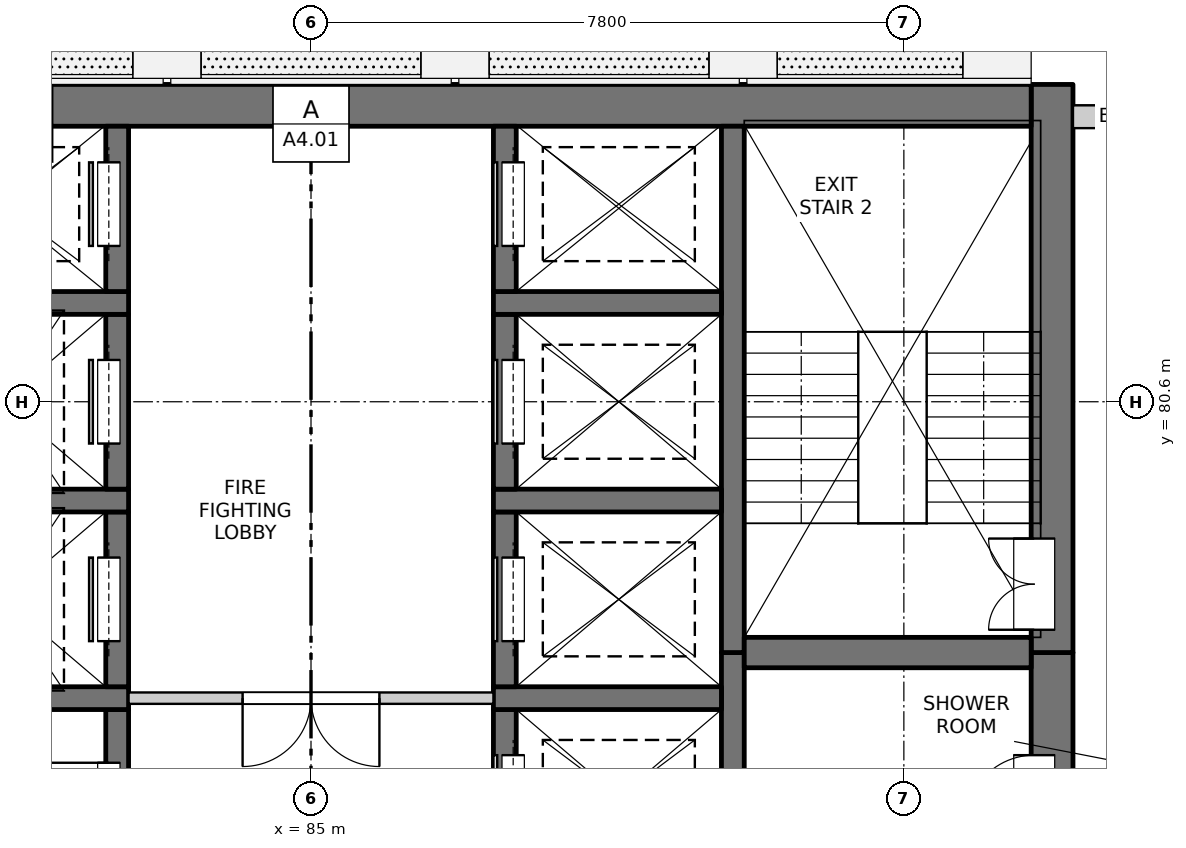
"""IFC4 building model, lengths in metres.
Left out: names, types, materials, properties, quantities, classifications, styles, units other than length and angle.
Written with IfcOpenShell. Run it as: python <this file> out.ifc"""

import sys

from ifc_helpers import new_model, si_unit, direction, frame, frame_2d, origin, place, context, subcontext, project, spatial, rectangle, extrude, element, fill, save


model = new_model("IFC4")
c1 = context("Model", 3, precision=1e-05, world=origin(), true_north=direction((0.0, 1.0)))
c2 = subcontext(c1, "Body", "Model", "MODEL_VIEW")
j1 = project(units=[si_unit("LENGTHUNIT", "METRE"), si_unit("PLANEANGLEUNIT", "RADIAN")], contexts=[c1])
p1 = place(None, origin())
s1 = spatial("IfcSite", under=j1, at=p1, CompositionType="ELEMENT")
p2 = place(p1, origin())
s2 = spatial("IfcBuilding", under=s1, at=p2, CompositionType="ELEMENT")
p3 = place(p2, frame((0.0, 0.0, 140.7)))
s3 = spatial("IfcBuildingStorey", under=s2, at=p3, CompositionType="ELEMENT", Elevation=140.7)
p4 = place(p3, frame((94.75, 61.95, -0.25), z_axis=(0.0, 0.0, 1.0), x_axis=(0.0, 1.0, 0.0)))
e1 = element("IfcWall", 1, at=p4, inside=s3, PredefinedType="SOLIDWALL", context=c2, shape_type="SweptSolid", body=[
    extrude(rectangle(XDim=15.35, YDim=0.55, at=frame_2d((7.675, 0.0))), origin(), (0.0, 0.0, 1.0), 3.35),
])
p5 = place(p4, frame((0.925, 0.0, 0.25)))
e2 = element("IfcOpeningElement", 2, at=p5, cuts=e1, PredefinedType="OPENING", context=c2, shape_type="SweptSolid", body=[
    extrude(rectangle(XDim=0.9, YDim=2.1, at=frame_2d((0.45, 1.05))), frame((0.0, 0.285, 0.0), z_axis=(0.0, -1.0, 0.0), x_axis=(1.0, 0.0, 0.0)), (0.0, 0.0, 1.0), 0.57),
])
p6 = place(p4, frame((3.8, 0.0, 0.25)))
e3 = element("IfcOpeningElement", 3, at=p6, cuts=e1, PredefinedType="OPENING", context=c2, shape_type="SweptSolid", body=[
    extrude(rectangle(XDim=0.9, YDim=2.1, at=frame_2d((0.45, 1.05))), frame((0.0, 0.285, 0.0), z_axis=(0.0, -1.0, 0.0), x_axis=(1.0, 0.0, 0.0)), (0.0, 0.0, 1.0), 0.57),
])
p7 = place(p4, frame((6.8, 0.0, 0.25)))
e4 = element("IfcOpeningElement", 4, at=p7, cuts=e1, PredefinedType="OPENING", context=c2, shape_type="SweptSolid", body=[
    extrude(rectangle(XDim=0.9, YDim=2.1, at=frame_2d((0.45, 1.05))), frame((0.0, 0.285, 0.0), z_axis=(0.0, -1.0, 0.0), x_axis=(1.0, 0.0, 0.0)), (0.0, 0.0, 1.0), 0.57),
])
p8 = place(p4, frame((9.8, 0.0, 0.25)))
e5 = element("IfcOpeningElement", 5, at=p8, cuts=e1, PredefinedType="OPENING", context=c2, shape_type="SweptSolid", body=[
    extrude(rectangle(XDim=0.9, YDim=2.1, at=frame_2d((0.45, 1.05))), frame((0.0, 0.285, 0.0), z_axis=(0.0, -1.0, 0.0), x_axis=(1.0, 0.0, 0.0)), (0.0, 0.0, 1.0), 0.57),
])
p9 = place(p4, frame((13.1, 0.0, 0.25)))
e6 = element("IfcOpeningElement", 6, at=p9, cuts=e1, PredefinedType="OPENING", context=c2, shape_type="SweptSolid", body=[
    extrude(rectangle(XDim=0.9, YDim=2.1, at=frame_2d((0.45, 1.05))), frame((0.0, 0.285, 0.0), z_axis=(0.0, -1.0, 0.0), x_axis=(1.0, 0.0, 0.0)), (0.0, 0.0, 1.0), 0.57),
])
p10 = place(p3, frame((94.75, 77.3, -0.25), z_axis=(0.0, 0.0, 1.0), x_axis=(0.0, 1.0, 0.0)))
e7 = element("IfcWall", 7, at=p10, inside=s3, PredefinedType="SOLIDWALL", context=c2, shape_type="SweptSolid", body=[
    extrude(rectangle(XDim=7.475, YDim=0.55, at=frame_2d((3.737, 0.0))), origin(), (0.0, 0.0, 1.0), 3.35),
])
p11 = place(p10, frame((0.3, 0.0, 0.25)))
e8 = element("IfcOpeningElement", 8, at=p11, cuts=e7, PredefinedType="OPENING", context=c2, shape_type="SweptSolid", body=[
    extrude(rectangle(XDim=1.2, YDim=2.1, at=frame_2d((0.6, 1.05))), frame((0.0, 0.285, 0.0), z_axis=(0.0, -1.0, 0.0), x_axis=(1.0, 0.0, 0.0)), (0.0, 0.0, 1.0), 0.57),
])
p12 = place(p3, frame((75.525, 84.5, -0.25), z_axis=(0.0, 0.0, 1.0), x_axis=(1.0, 0.0, 0.0)))
e9 = element("IfcWall", 9, at=p12, inside=s3, PredefinedType="SOLIDWALL", context=c2, shape_type="SweptSolid", body=[
    extrude(rectangle(XDim=18.95, YDim=0.55, at=frame_2d((9.475, 0.0))), origin(), (0.0, 0.0, 1.0), 3.35),
])
p13 = place(p3, frame((90.55, 61.95, -0.25), z_axis=(0.0, 0.0, 1.0), x_axis=(0.0, 1.0, 0.0)))
e10 = element("IfcWall", 10, at=p13, inside=s3, PredefinedType="SOLIDWALL", context=c2, shape_type="SweptSolid", body=[
    extrude(rectangle(XDim=15.35, YDim=0.3, at=frame_2d((7.675, 0.0))), origin(), (0.0, 0.0, 1.0), 3.35),
])
p14 = place(p3, frame((90.55, 77.3, -0.25), z_axis=(0.0, 0.0, 1.0), x_axis=(0.0, 1.0, 0.0)))
e11 = element("IfcWall", 11, at=p14, inside=s3, PredefinedType="SOLIDWALL", context=c2, shape_type="SweptSolid", body=[
    extrude(rectangle(XDim=6.925, YDim=0.3, at=frame_2d((3.462, 0.0))), origin(), (0.0, 0.0, 1.0), 3.35),
])
p15 = place(p3, frame((82.45, 74.25, -0.25), z_axis=(0.0, 0.0, 1.0), x_axis=(0.0, 1.0, 0.0)))
e12 = element("IfcWall", 12, at=p15, inside=s3, PredefinedType="SOLIDWALL", context=c2, shape_type="SweptSolid", body=[
    extrude(rectangle(XDim=2.3, YDim=0.3, at=frame_2d((1.15, 0.0))), origin(), (0.0, 0.0, 1.0), 3.35),
])
p16 = place(p15, frame((0.7, 0.0, 0.25)))
e13 = element("IfcOpeningElement", 13, at=p16, cuts=e12, PredefinedType="OPENING", context=c2, shape_type="SweptSolid", body=[
    extrude(rectangle(XDim=0.9, YDim=2.1, at=frame_2d((0.45, 1.05))), frame((0.0, 0.16, 0.0), z_axis=(0.0, -1.0, 0.0), x_axis=(1.0, 0.0, 0.0)), (0.0, 0.0, 1.0), 0.32),
])
p17 = place(p3, frame((79.6, 76.7, -0.25), z_axis=(0.0, 0.0, 1.0), x_axis=(1.0, 0.0, 0.0)))
e14 = element("IfcWall", 14, at=p17, inside=s3, PredefinedType="SOLIDWALL", context=c2, shape_type="SweptSolid", body=[
    extrude(rectangle(XDim=3.0, YDim=0.3, at=frame_2d((1.5, 0.0))), origin(), (0.0, 0.0, 1.0), 3.35),
])
p18 = place(p3, frame((82.45, 76.85, -0.25), z_axis=(0.0, 0.0, 1.0), x_axis=(0.0, 1.0, 0.0)))
e15 = element("IfcWall", 15, at=p18, inside=s3, PredefinedType="SOLIDWALL", context=c2, shape_type="SweptSolid", body=[
    extrude(rectangle(XDim=2.3, YDim=0.3, at=frame_2d((1.15, 0.0))), origin(), (0.0, 0.0, 1.0), 3.35),
])
p19 = place(p18, frame((0.6, 0.0, 0.25)))
e16 = element("IfcOpeningElement", 16, at=p19, cuts=e15, PredefinedType="OPENING", context=c2, shape_type="SweptSolid", body=[
    extrude(rectangle(XDim=1.1, YDim=2.1, at=frame_2d((0.55, 1.05))), frame((0.0, 0.16, 0.0), z_axis=(0.0, -1.0, 0.0), x_axis=(1.0, 0.0, 0.0)), (0.0, 0.0, 1.0), 0.32),
])
p20 = place(p3, frame((79.6, 79.3, -0.25), z_axis=(0.0, 0.0, 1.0), x_axis=(1.0, 0.0, 0.0)))
e17 = element("IfcWall", 17, at=p20, inside=s3, PredefinedType="SOLIDWALL", context=c2, shape_type="SweptSolid", body=[
    extrude(rectangle(XDim=3.0, YDim=0.3, at=frame_2d((1.5, 0.0))), origin(), (0.0, 0.0, 1.0), 3.35),
])
p21 = place(p3, frame((82.45, 79.45, -0.25), z_axis=(0.0, 0.0, 1.0), x_axis=(0.0, 1.0, 0.0)))
e18 = element("IfcWall", 18, at=p21, inside=s3, PredefinedType="SOLIDWALL", context=c2, shape_type="SweptSolid", body=[
    extrude(rectangle(XDim=2.3, YDim=0.3, at=frame_2d((1.15, 0.0))), origin(), (0.0, 0.0, 1.0), 3.35),
])
p22 = place(p21, frame((0.6, 0.0, 0.25)))
e19 = element("IfcOpeningElement", 19, at=p22, cuts=e18, PredefinedType="OPENING", context=c2, shape_type="SweptSolid", body=[
    extrude(rectangle(XDim=1.1, YDim=2.1, at=frame_2d((0.55, 1.05))), frame((0.0, 0.16, 0.0), z_axis=(0.0, -1.0, 0.0), x_axis=(1.0, 0.0, 0.0)), (0.0, 0.0, 1.0), 0.32),
])
p23 = place(p3, frame((79.6, 81.9, -0.25), z_axis=(0.0, 0.0, 1.0), x_axis=(1.0, 0.0, 0.0)))
e20 = element("IfcWall", 20, at=p23, inside=s3, PredefinedType="SOLIDWALL", context=c2, shape_type="SweptSolid", body=[
    extrude(rectangle(XDim=3.0, YDim=0.3, at=frame_2d((1.5, 0.0))), origin(), (0.0, 0.0, 1.0), 3.35),
])
p24 = place(p3, frame((82.45, 82.05, -0.25), z_axis=(0.0, 0.0, 1.0), x_axis=(0.0, 1.0, 0.0)))
e21 = element("IfcWall", 21, at=p24, inside=s3, PredefinedType="SOLIDWALL", context=c2, shape_type="SweptSolid", body=[
    extrude(rectangle(XDim=2.175, YDim=0.3, at=frame_2d((1.087, 0.0))), origin(), (0.0, 0.0, 1.0), 3.35),
])
p25 = place(p24, frame((0.6, 0.0, 0.25)))
e22 = element("IfcOpeningElement", 22, at=p25, cuts=e21, PredefinedType="OPENING", context=c2, shape_type="SweptSolid", body=[
    extrude(rectangle(XDim=1.1, YDim=2.1, at=frame_2d((0.55, 1.05))), frame((0.0, 0.16, 0.0), z_axis=(0.0, -1.0, 0.0), x_axis=(1.0, 0.0, 0.0)), (0.0, 0.0, 1.0), 0.32),
])
p26 = place(p3, frame((87.55, 74.25, -0.25), z_axis=(0.0, 0.0, 1.0), x_axis=(0.0, 1.0, 0.0)))
e23 = element("IfcWall", 23, at=p26, inside=s3, PredefinedType="SOLIDWALL", context=c2, shape_type="SweptSolid", body=[
    extrude(rectangle(XDim=2.3, YDim=0.3, at=frame_2d((1.15, 0.0))), origin(), (0.0, 0.0, 1.0), 3.35),
])
p27 = place(p26, frame((0.6, 0.0, 0.25)))
e24 = element("IfcOpeningElement", 24, at=p27, cuts=e23, PredefinedType="OPENING", context=c2, shape_type="SweptSolid", body=[
    extrude(rectangle(XDim=1.1, YDim=2.1, at=frame_2d((0.55, 1.05))), frame((0.0, 0.16, 0.0), z_axis=(0.0, -1.0, 0.0), x_axis=(1.0, 0.0, 0.0)), (0.0, 0.0, 1.0), 0.32),
])
p28 = place(p3, frame((87.4, 76.7, -0.25), z_axis=(0.0, 0.0, 1.0), x_axis=(1.0, 0.0, 0.0)))
e25 = element("IfcWall", 25, at=p28, inside=s3, PredefinedType="SOLIDWALL", context=c2, shape_type="SweptSolid", body=[
    extrude(rectangle(XDim=3.0, YDim=0.3, at=frame_2d((1.5, 0.0))), origin(), (0.0, 0.0, 1.0), 3.35),
])
p29 = place(p3, frame((87.55, 76.85, -0.25), z_axis=(0.0, 0.0, 1.0), x_axis=(0.0, 1.0, 0.0)))
e26 = element("IfcWall", 26, at=p29, inside=s3, PredefinedType="SOLIDWALL", context=c2, shape_type="SweptSolid", body=[
    extrude(rectangle(XDim=2.3, YDim=0.3, at=frame_2d((1.15, 0.0))), origin(), (0.0, 0.0, 1.0), 3.35),
])
p30 = place(p29, frame((0.6, 0.0, 0.25)))
e27 = element("IfcOpeningElement", 27, at=p30, cuts=e26, PredefinedType="OPENING", context=c2, shape_type="SweptSolid", body=[
    extrude(rectangle(XDim=1.1, YDim=2.1, at=frame_2d((0.55, 1.05))), frame((0.0, 0.16, 0.0), z_axis=(0.0, -1.0, 0.0), x_axis=(1.0, 0.0, 0.0)), (0.0, 0.0, 1.0), 0.32),
])
p31 = place(p3, frame((87.4, 79.3, -0.25), z_axis=(0.0, 0.0, 1.0), x_axis=(1.0, 0.0, 0.0)))
e28 = element("IfcWall", 28, at=p31, inside=s3, PredefinedType="SOLIDWALL", context=c2, shape_type="SweptSolid", body=[
    extrude(rectangle(XDim=3.0, YDim=0.3, at=frame_2d((1.5, 0.0))), origin(), (0.0, 0.0, 1.0), 3.35),
])
p32 = place(p3, frame((87.55, 79.45, -0.25), z_axis=(0.0, 0.0, 1.0), x_axis=(0.0, 1.0, 0.0)))
e29 = element("IfcWall", 29, at=p32, inside=s3, PredefinedType="SOLIDWALL", context=c2, shape_type="SweptSolid", body=[
    extrude(rectangle(XDim=2.3, YDim=0.3, at=frame_2d((1.15, 0.0))), origin(), (0.0, 0.0, 1.0), 3.35),
])
p33 = place(p32, frame((0.6, 0.0, 0.25)))
e30 = element("IfcOpeningElement", 30, at=p33, cuts=e29, PredefinedType="OPENING", context=c2, shape_type="SweptSolid", body=[
    extrude(rectangle(XDim=1.1, YDim=2.1, at=frame_2d((0.55, 1.05))), frame((0.0, 0.16, 0.0), z_axis=(0.0, -1.0, 0.0), x_axis=(1.0, 0.0, 0.0)), (0.0, 0.0, 1.0), 0.32),
])
p34 = place(p3, frame((87.4, 81.9, -0.25), z_axis=(0.0, 0.0, 1.0), x_axis=(1.0, 0.0, 0.0)))
e31 = element("IfcWall", 31, at=p34, inside=s3, PredefinedType="SOLIDWALL", context=c2, shape_type="SweptSolid", body=[
    extrude(rectangle(XDim=3.0, YDim=0.3, at=frame_2d((1.5, 0.0))), origin(), (0.0, 0.0, 1.0), 3.35),
])
p35 = place(p3, frame((87.55, 82.05, -0.25), z_axis=(0.0, 0.0, 1.0), x_axis=(0.0, 1.0, 0.0)))
e32 = element("IfcWall", 32, at=p35, inside=s3, PredefinedType="SOLIDWALL", context=c2, shape_type="SweptSolid", body=[
    extrude(rectangle(XDim=2.175, YDim=0.3, at=frame_2d((1.087, 0.0))), origin(), (0.0, 0.0, 1.0), 3.35),
])
p36 = place(p35, frame((0.6, 0.0, 0.25)))
e33 = element("IfcOpeningElement", 33, at=p36, cuts=e32, PredefinedType="OPENING", context=c2, shape_type="SweptSolid", body=[
    extrude(rectangle(XDim=1.1, YDim=2.1, at=frame_2d((0.55, 1.05))), frame((0.0, 0.16, 0.0), z_axis=(0.0, -1.0, 0.0), x_axis=(1.0, 0.0, 0.0)), (0.0, 0.0, 1.0), 0.32),
])
p37 = place(p3, frame((90.7, 77.3, -0.25), z_axis=(0.0, 0.0, 1.0), x_axis=(1.0, 0.0, 0.0)))
e34 = element("IfcWall", 34, at=p37, inside=s3, PredefinedType="SOLIDWALL", context=c2, shape_type="SweptSolid", body=[
    extrude(rectangle(XDim=3.775, YDim=0.4, at=frame_2d((1.888, 0.0))), origin(), (0.0, 0.0, 1.0), 3.35),
])
p38 = place(p3, frame((95.025, 84.35, 0.0), z_axis=(0.0, 0.0, 1.0), x_axis=(1.0, 0.0, 0.0)))
e35 = element("IfcWall", 35, at=p38, inside=s3, PredefinedType="SOLIDWALL", context=c2, shape_type="SweptSolid", body=[
    extrude(rectangle(XDim=1.25, YDim=0.3, at=frame_2d((0.625, 0.0))), origin(), (0.0, 0.0, 1.0), 3.1),
])
p39 = place(p3, frame((82.6, 76.7, 0.0), z_axis=(0.0, 0.0, 1.0), x_axis=(1.0, 0.0, 0.0)))
e36 = element("IfcWall", 36, at=p39, inside=s3, PredefinedType="PARTITIONING", context=c2, shape_type="SweptSolid", body=[
    extrude(rectangle(XDim=4.8, YDim=0.15, at=frame_2d((2.4, 0.0))), origin(), (0.0, 0.0, 1.0), 3.1),
])
p40 = place(p39, frame((1.5, 0.0, 0.0)))
e37 = element("IfcOpeningElement", 37, at=p40, cuts=e36, PredefinedType="OPENING", context=c2, shape_type="SweptSolid", body=[
    extrude(rectangle(XDim=1.8, YDim=2.1, at=frame_2d((0.9, 1.05))), frame((0.0, 0.085, 0.0), z_axis=(0.0, -1.0, 0.0), x_axis=(1.0, 0.0, 0.0)), (0.0, 0.0, 1.0), 0.17),
])
p41 = place(p16, origin())
e38 = element("IfcDoor", 38, at=p41, inside=s3, OperationType="SINGLE_SWING_RIGHT", PredefinedType="DOOR", context=c2, shape_type="SweptSolid", body=[
    extrude(rectangle(XDim=0.9, YDim=2.1, at=frame_2d((0.45, 1.05))), frame((0.0, 0.135, 0.0), z_axis=(0.0, -1.0, 0.0), x_axis=(1.0, 0.0, 0.0)), (0.0, 0.0, 1.0), 0.05),
])
fill(e13, e38)
p42 = place(p27, origin())
e39 = element("IfcDoor", 39, at=p42, inside=s3, OperationType="SLIDING_TO_LEFT", PredefinedType="DOOR", context=c2, shape_type="SweptSolid", body=[
    extrude(rectangle(XDim=1.1, YDim=2.1, at=frame_2d((0.55, 1.05))), frame((0.0, -0.085, 0.0), z_axis=(0.0, -1.0, 0.0), x_axis=(1.0, 0.0, 0.0)), (0.0, 0.0, 1.0), 0.05),
])
fill(e24, e39)
p43 = place(p9, origin())
e40 = element("IfcDoor", 40, at=p43, inside=s3, OperationType="SINGLE_SWING_LEFT", PredefinedType="DOOR", context=c2, shape_type="SweptSolid", body=[
    extrude(rectangle(XDim=0.9, YDim=2.1, at=frame_2d((0.45, 1.05))), frame((0.0, 0.26, 0.0), z_axis=(0.0, -1.0, 0.0), x_axis=(1.0, 0.0, 0.0)), (0.0, 0.0, 1.0), 0.05),
])
fill(e6, e40)
p44 = place(p40, origin())
e41 = element("IfcDoor", 41, at=p44, inside=s3, OperationType="DOUBLE_DOOR_SINGLE_SWING", PredefinedType="DOOR", context=c2, shape_type="SweptSolid", body=[
    extrude(rectangle(XDim=1.8, YDim=2.1, at=frame_2d((0.9, 1.05))), frame((0.0, 0.025, 0.0), z_axis=(0.0, -1.0, 0.0), x_axis=(1.0, 0.0, 0.0)), (0.0, 0.0, 1.0), 0.05),
])
fill(e37, e41)
p45 = place(p19, origin())
e42 = element("IfcDoor", 42, at=p45, inside=s3, OperationType="SLIDING_TO_LEFT", PredefinedType="DOOR", context=c2, shape_type="SweptSolid", body=[
    extrude(rectangle(XDim=1.1, YDim=2.1, at=frame_2d((0.55, 1.05))), frame((0.0, 0.135, 0.0), z_axis=(0.0, -1.0, 0.0), x_axis=(1.0, 0.0, 0.0)), (0.0, 0.0, 1.0), 0.05),
])
fill(e16, e42)
p46 = place(p30, origin())
e43 = element("IfcDoor", 43, at=p46, inside=s3, OperationType="SLIDING_TO_LEFT", PredefinedType="DOOR", context=c2, shape_type="SweptSolid", body=[
    extrude(rectangle(XDim=1.1, YDim=2.1, at=frame_2d((0.55, 1.05))), frame((0.0, -0.085, 0.0), z_axis=(0.0, -1.0, 0.0), x_axis=(1.0, 0.0, 0.0)), (0.0, 0.0, 1.0), 0.05),
])
fill(e27, e43)
p47 = place(p11, origin())
e44 = element("IfcDoor", 44, at=p47, inside=s3, OperationType="DOUBLE_DOOR_SINGLE_SWING", PredefinedType="DOOR", context=c2, shape_type="SweptSolid", body=[
    extrude(rectangle(XDim=1.2, YDim=2.1, at=frame_2d((0.6, 1.05))), frame((0.0, 0.26, 0.0), z_axis=(0.0, -1.0, 0.0), x_axis=(1.0, 0.0, 0.0)), (0.0, 0.0, 1.0), 0.05),
])
fill(e8, e44)
p48 = place(p22, origin())
e45 = element("IfcDoor", 45, at=p48, inside=s3, OperationType="SLIDING_TO_LEFT", PredefinedType="DOOR", context=c2, shape_type="SweptSolid", body=[
    extrude(rectangle(XDim=1.1, YDim=2.1, at=frame_2d((0.55, 1.05))), frame((0.0, 0.135, 0.0), z_axis=(0.0, -1.0, 0.0), x_axis=(1.0, 0.0, 0.0)), (0.0, 0.0, 1.0), 0.05),
])
fill(e19, e45)
p49 = place(p33, origin())
e46 = element("IfcDoor", 46, at=p49, inside=s3, OperationType="SLIDING_TO_RIGHT", PredefinedType="DOOR", context=c2, shape_type="SweptSolid", body=[
    extrude(rectangle(XDim=1.1, YDim=2.1, at=frame_2d((0.55, 1.05))), frame((0.0, -0.085, 0.0), z_axis=(0.0, -1.0, 0.0), x_axis=(1.0, 0.0, 0.0)), (0.0, 0.0, 1.0), 0.05),
])
fill(e30, e46)
p50 = place(p25, origin())
e47 = element("IfcDoor", 47, at=p50, inside=s3, OperationType="SLIDING_TO_RIGHT", PredefinedType="DOOR", context=c2, shape_type="SweptSolid", body=[
    extrude(rectangle(XDim=1.1, YDim=2.1, at=frame_2d((0.55, 1.05))), frame((0.0, 0.135, 0.0), z_axis=(0.0, -1.0, 0.0), x_axis=(1.0, 0.0, 0.0)), (0.0, 0.0, 1.0), 0.05),
])
fill(e22, e47)
p51 = place(p36, origin())
e48 = element("IfcDoor", 48, at=p51, inside=s3, OperationType="SLIDING_TO_RIGHT", PredefinedType="DOOR", context=c2, shape_type="SweptSolid", body=[
    extrude(rectangle(XDim=1.1, YDim=2.1, at=frame_2d((0.55, 1.05))), frame((0.0, -0.085, 0.0), z_axis=(0.0, -1.0, 0.0), x_axis=(1.0, 0.0, 0.0)), (0.0, 0.0, 1.0), 0.05),
])
fill(e33, e48)
save(model, sys.argv[1])
